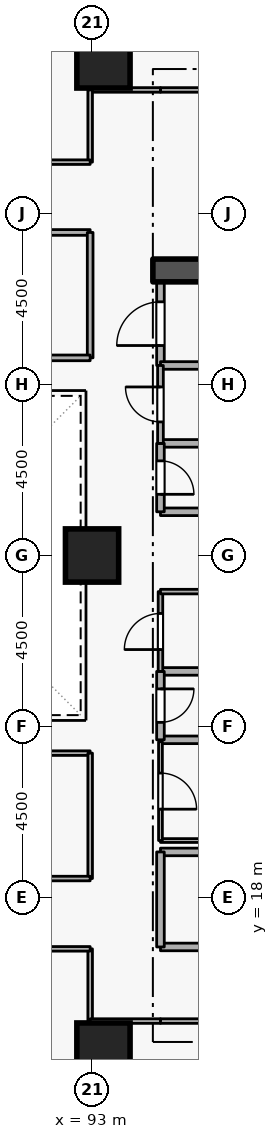
"""IFC4 building model, lengths in metres.
Left out: names, types, materials, properties, quantities, classifications, styles, units other than length and angle.
Written with IfcOpenShell. Run it as: python <this file> out.ifc"""

import sys

from ifc_helpers import new_model, si_unit, direction, frame, frame_2d, origin, origin_2d, place, context, subcontext, project, spatial, rectangle, extrude, element, fill, save


model = new_model("IFC4")
c1 = context("Model", 3, precision=1e-05, world=origin(), true_north=direction((0.0, 1.0)))
c2 = subcontext(c1, "Body", "Model", "MODEL_VIEW")
j1 = project(units=[si_unit("LENGTHUNIT", "METRE"), si_unit("PLANEANGLEUNIT", "RADIAN")], contexts=[c1])
p1 = place(None, origin())
s1 = spatial("IfcSite", under=j1, at=p1, CompositionType="ELEMENT")
p2 = place(p1, origin())
s2 = spatial("IfcBuilding", under=s1, at=p2, CompositionType="ELEMENT")
p3 = place(p2, frame((0.0, 0.0, 42.3)))
s3 = spatial("IfcBuildingStorey", under=s2, at=p3, CompositionType="ELEMENT", Elevation=42.3)
p4 = place(p3, frame((94.6, 34.5, 0.0), z_axis=(0.0, 0.0, 1.0), x_axis=(1.0, 0.0, 0.0)))
e1 = element("IfcWall", 1, at=p4, inside=s3, PredefinedType="SHEAR", context=c2, shape_type="SweptSolid", body=[
    extrude(rectangle(XDim=5.7, YDim=0.6, at=frame_2d((2.85, 0.0))), origin(), (0.0, 0.0, 1.0), 3.6),
])
for number, where, z_axis, x_axis in (
    (2, (93.3, 14.0, 0.0), (0.0, 0.0, 1.0), (1.0, 0.0, 0.0)),
    (3, (93.3, 40.0, 0.0), (0.0, 0.0, 1.0), (1.0, 0.0, 0.0)),
    (4, (93.0, 27.0, 0.0), (0.0, 0.0, 1.0), (1.0, 0.0, 0.0)),
):
    element("IfcColumn", number, at=place(p3, frame(where, z_axis=z_axis, x_axis=x_axis)), inside=s3, PredefinedType="COLUMN", context=c2, shape_type="SweptSolid", body=[
        extrude(rectangle(XDim=1.4, YDim=1.4, at=origin_2d()), origin(), (0.0, 0.0, 1.0), 3.6),
    ])
p5 = place(p3, frame((94.8, 16.7, 0.0), z_axis=(0.0, 0.0, 1.0), x_axis=(1.0, 0.0, 0.0)))
e5 = element("IfcWall", 5, at=p5, inside=s3, PredefinedType="STANDARD", context=c2, shape_type="SweptSolid", body=[
    extrude(rectangle(XDim=5.7, YDim=0.2, at=frame_2d((2.85, 0.0))), origin(), (0.0, 0.0, 1.0), 3.34),
])
p6 = place(p5, frame((2.275, 0.0, 0.0)))
e6 = element("IfcOpeningElement", 6, at=p6, cuts=e5, PredefinedType="OPENING", context=c2, shape_type="SweptSolid", body=[
    extrude(rectangle(XDim=1.15, YDim=2.1, at=frame_2d((0.575, 1.05))), frame((0.0, 0.11, 0.0), z_axis=(0.0, -1.0, 0.0), x_axis=(1.0, 0.0, 0.0)), (0.0, 0.0, 1.0), 0.22),
])
p7 = place(p3, frame((97.1, 19.2, 0.0), z_axis=(0.0, 0.0, 1.0), x_axis=(-1.0, 0.0, 0.0)))
e7 = element("IfcWall", 7, at=p7, inside=s3, PredefinedType="STANDARD", context=c2, shape_type="SweptSolid", body=[
    extrude(rectangle(XDim=2.3, YDim=0.2, at=frame_2d((1.15, 0.0))), origin(), (0.0, 0.0, 1.0), 2.545),
])
p8 = place(p3, frame((94.8, 19.2, 0.0), z_axis=(0.0, 0.0, 1.0), x_axis=(0.0, -1.0, 0.0)))
e8 = element("IfcWall", 8, at=p8, inside=s3, PredefinedType="STANDARD", context=c2, shape_type="SweptSolid", body=[
    extrude(rectangle(XDim=2.5, YDim=0.2, at=frame_2d((1.25, 0.0))), origin(), (0.0, 0.0, 1.0), 3.34),
])
for number, where, z_axis, x_axis in (
    (9, (94.8, 28.15, 0.0), (0.0, 0.0, 1.0), (1.0, 0.0, 0.0)),
    (10, (96.85, 29.95, 0.0), (0.0, 0.0, 1.0), (-1.0, 0.0, 0.0)),
):
    element("IfcWall", number, at=place(p3, frame(where, z_axis=z_axis, x_axis=x_axis)), inside=s3, PredefinedType="STANDARD", context=c2, shape_type="SweptSolid", body=[
        extrude(rectangle(XDim=2.05, YDim=0.2, at=frame_2d((1.025, 0.0))), origin(), (0.0, 0.0, 1.0), 3.34),
    ])
p9 = place(p3, frame((94.8, 29.95, 0.0), z_axis=(0.0, 0.0, 1.0), x_axis=(0.0, -1.0, 0.0)))
e11 = element("IfcWall", 11, at=p9, inside=s3, PredefinedType="STANDARD", context=c2, shape_type="SweptSolid", body=[
    extrude(rectangle(XDim=1.8, YDim=0.2, at=frame_2d((0.9, 0.0))), origin(), (0.0, 0.0, 1.0), 3.34),
])
p10 = place(p9, frame((0.46, 0.0, 0.0)))
e12 = element("IfcOpeningElement", 12, at=p10, cuts=e11, PredefinedType="OPENING", context=c2, shape_type="SweptSolid", body=[
    extrude(rectangle(XDim=0.88, YDim=2.04, at=frame_2d((0.44, 1.02))), frame((0.0, 0.11, 0.0), z_axis=(0.0, -1.0, 0.0), x_axis=(1.0, 0.0, 0.0)), (0.0, 0.0, 1.0), 0.22),
])
for number, where, z_axis, x_axis in (
    (13, (94.8, 22.15, 0.0), (0.0, 0.0, 1.0), (1.0, 0.0, 0.0)),
    (14, (96.85, 23.95, 0.0), (0.0, 0.0, 1.0), (-1.0, 0.0, 0.0)),
):
    element("IfcWall", number, at=place(p3, frame(where, z_axis=z_axis, x_axis=x_axis)), inside=s3, PredefinedType="STANDARD", context=c2, shape_type="SweptSolid", body=[
        extrude(rectangle(XDim=2.05, YDim=0.2, at=frame_2d((1.025, 0.0))), origin(), (0.0, 0.0, 1.0), 3.34),
    ])
p11 = place(p3, frame((94.8, 23.95, 0.0), z_axis=(0.0, 0.0, 1.0), x_axis=(0.0, -1.0, 0.0)))
e15 = element("IfcWall", 15, at=p11, inside=s3, PredefinedType="STANDARD", context=c2, shape_type="SweptSolid", body=[
    extrude(rectangle(XDim=1.8, YDim=0.2, at=frame_2d((0.9, 0.0))), origin(), (0.0, 0.0, 1.0), 3.34),
])
p12 = place(p11, frame((0.46, 0.0, 0.0)))
e16 = element("IfcOpeningElement", 16, at=p12, cuts=e15, PredefinedType="OPENING", context=c2, shape_type="SweptSolid", body=[
    extrude(rectangle(XDim=0.88, YDim=2.04, at=frame_2d((0.44, 1.02))), frame((0.0, 0.11, 0.0), z_axis=(0.0, -1.0, 0.0), x_axis=(1.0, 0.0, 0.0)), (0.0, 0.0, 1.0), 0.22),
])
p13 = place(p3, frame((94.8, 32.0, 0.0), z_axis=(0.0, 0.0, 1.0), x_axis=(0.0, 1.0, 0.0)))
e17 = element("IfcWall", 17, at=p13, inside=s3, PredefinedType="STANDARD", context=c2, shape_type="SweptSolid", body=[
    extrude(rectangle(XDim=2.2, YDim=0.2, at=frame_2d((1.1, 0.0))), origin(), (0.0, 0.0, 1.0), 3.34),
])
p14 = place(p13, frame((0.525, 0.0, 0.0)))
e18 = element("IfcOpeningElement", 18, at=p14, cuts=e17, PredefinedType="OPENING", context=c2, shape_type="SweptSolid", body=[
    extrude(rectangle(XDim=1.15, YDim=2.1, at=frame_2d((0.575, 1.05))), frame((0.0, 0.11, 0.0), z_axis=(0.0, -1.0, 0.0), x_axis=(1.0, 0.0, 0.0)), (0.0, 0.0, 1.0), 0.22),
])
p15 = place(p3, frame((96.85, 32.0, 0.0), z_axis=(0.0, 0.0, 1.0), x_axis=(-1.0, 0.0, 0.0)))
e19 = element("IfcWall", 19, at=p15, inside=s3, PredefinedType="STANDARD", context=c2, shape_type="SweptSolid", body=[
    extrude(rectangle(XDim=2.05, YDim=0.2, at=frame_2d((1.025, 0.0))), origin(), (0.0, 0.0, 1.0), 3.34),
])
p16 = place(p3, frame((94.8, 19.5, 0.0), z_axis=(0.0, 0.0, 1.0), x_axis=(1.0, 0.0, 0.0)))
e20 = element("IfcWall", 20, at=p16, inside=s3, PredefinedType="PARTITIONING", context=c2, shape_type="SweptSolid", body=[
    extrude(rectangle(XDim=2.05, YDim=0.1, at=frame_2d((1.025, 0.0))), origin(), (0.0, 0.0, 1.0), 2.545),
])
p17 = place(p3, frame((94.8, 22.1, 0.0), z_axis=(0.0, 0.0, 1.0), x_axis=(0.0, -1.0, 0.0)))
e21 = element("IfcWall", 21, at=p17, inside=s3, PredefinedType="PARTITIONING", context=c2, shape_type="SweptSolid", body=[
    extrude(rectangle(XDim=2.6, YDim=0.1, at=frame_2d((1.3, 0.0))), origin(), (0.0, 0.0, 1.0), 3.34),
])
p18 = place(p17, frame((0.825, 0.0, 0.0)))
e22 = element("IfcOpeningElement", 22, at=p18, cuts=e21, PredefinedType="OPENING", context=c2, shape_type="SweptSolid", body=[
    extrude(rectangle(XDim=0.95, YDim=2.1, at=frame_2d((0.475, 1.05))), frame((0.0, 0.06, 0.0), z_axis=(0.0, -1.0, 0.0), x_axis=(1.0, 0.0, 0.0)), (0.0, 0.0, 1.0), 0.12),
])
p19 = place(p3, frame((94.8, 23.95, 0.0), z_axis=(0.0, 0.0, 1.0), x_axis=(0.0, 1.0, 0.0)))
e23 = element("IfcWall", 23, at=p19, inside=s3, PredefinedType="PARTITIONING", context=c2, shape_type="SweptSolid", body=[
    extrude(rectangle(XDim=2.1, YDim=0.12, at=frame_2d((1.05, 0.0))), origin(), (0.0, 0.0, 1.0), 3.34),
])
p20 = place(p19, frame((0.575, 0.0, 0.0)))
e24 = element("IfcOpeningElement", 24, at=p20, cuts=e23, PredefinedType="OPENING", context=c2, shape_type="SweptSolid", body=[
    extrude(rectangle(XDim=0.95, YDim=2.1, at=frame_2d((0.475, 1.05))), frame((0.0, 0.07, 0.0), z_axis=(0.0, -1.0, 0.0), x_axis=(1.0, 0.0, 0.0)), (0.0, 0.0, 1.0), 0.14),
])
p21 = place(p3, frame((94.8, 26.05, 0.0), z_axis=(0.0, 0.0, 1.0), x_axis=(1.0, 0.0, 0.0)))
e25 = element("IfcWall", 25, at=p21, inside=s3, PredefinedType="PARTITIONING", context=c2, shape_type="SweptSolid", body=[
    extrude(rectangle(XDim=2.05, YDim=0.12, at=frame_2d((1.025, 0.0))), origin(), (0.0, 0.0, 1.0), 3.34),
])
p22 = place(p3, frame((94.8, 29.95, 0.0), z_axis=(0.0, 0.0, 1.0), x_axis=(0.0, 1.0, 0.0)))
e26 = element("IfcWall", 26, at=p22, inside=s3, PredefinedType="PARTITIONING", context=c2, shape_type="SweptSolid", body=[
    extrude(rectangle(XDim=2.05, YDim=0.15, at=frame_2d((1.025, 0.0))), origin(), (0.0, 0.0, 1.0), 3.34),
])
p23 = place(p22, frame((0.565, 0.0, 0.0)))
e27 = element("IfcOpeningElement", 27, at=p23, cuts=e26, PredefinedType="OPENING", context=c2, shape_type="SweptSolid", body=[
    extrude(rectangle(XDim=0.92, YDim=2.08, at=frame_2d((0.46, 1.04))), frame((0.0, 0.085, 0.0), z_axis=(0.0, -1.0, 0.0), x_axis=(1.0, 0.0, 0.0)), (0.0, 0.0, 1.0), 0.17),
])
p24 = place(p3, frame((92.95, 16.65, 0.0), z_axis=(0.0, 0.0, 1.0), x_axis=(0.0, -1.0, 0.0)))
e28 = element("IfcWall", 28, at=p24, inside=s3, PredefinedType="PARTITIONING", context=c2, shape_type="SweptSolid", body=[
    extrude(rectangle(XDim=1.9, YDim=0.12, at=frame_2d((0.95, 0.0))), origin(), (0.0, 0.0, 1.0), 3.34),
])
p25 = place(p3, frame((92.95, 14.75, 0.0), z_axis=(0.0, 0.0, 1.0), x_axis=(1.0, 0.0, 0.0)))
e29 = element("IfcWall", 29, at=p25, inside=s3, PredefinedType="PARTITIONING", context=c2, shape_type="SweptSolid", body=[
    extrude(rectangle(XDim=1.85, YDim=0.12, at=frame_2d((0.925, 0.0))), origin(), (0.0, 0.0, 1.0), 3.34),
])
p26 = place(p3, frame((94.8, 14.75, 0.0), z_axis=(0.0, 0.0, 1.0), x_axis=(1.0, 0.0, 0.0)))
e30 = element("IfcWall", 30, at=p26, inside=s3, PredefinedType="PARTITIONING", context=c2, shape_type="SweptSolid", body=[
    extrude(rectangle(XDim=9.35, YDim=0.12, at=frame_2d((4.675, 0.0))), origin(), (0.0, 0.0, 1.0), 3.34),
])
p27 = place(p26, frame((4.15, 0.0, 0.0)))
e31 = element("IfcOpeningElement", 31, at=p27, cuts=e30, PredefinedType="OPENING", context=c2, shape_type="SweptSolid", body=[
    extrude(rectangle(XDim=1.05, YDim=2.1, at=frame_2d((0.525, 1.05))), frame((0.0, 0.07, 0.0), z_axis=(0.0, -1.0, 0.0), x_axis=(1.0, 0.0, 0.0)), (0.0, 0.0, 1.0), 0.14),
])
p28 = place(p3, frame((88.5, 16.65, 0.0), z_axis=(0.0, 0.0, 1.0), x_axis=(1.0, 0.0, 0.0)))
e32 = element("IfcWall", 32, at=p28, inside=s3, PredefinedType="PARTITIONING", context=c2, shape_type="SweptSolid", body=[
    extrude(rectangle(XDim=4.45, YDim=0.12, at=frame_2d((2.225, 0.0))), origin(), (0.0, 0.0, 1.0), 3.34),
])
p29 = place(p3, frame((97.95, 39.25, 0.0), z_axis=(0.0, 0.0, 1.0), x_axis=(-1.0, 0.0, 0.0)))
e33 = element("IfcWall", 33, at=p29, inside=s3, PredefinedType="PARTITIONING", context=c2, shape_type="SweptSolid", body=[
    extrude(rectangle(XDim=3.15, YDim=0.12, at=frame_2d((1.575, 0.0))), origin(), (0.0, 0.0, 1.0), 3.34),
])
p30 = place(p3, frame((94.8, 39.25, 0.0), z_axis=(0.0, 0.0, 1.0), x_axis=(-1.0, 0.0, 0.0)))
e34 = element("IfcWall", 34, at=p30, inside=s3, PredefinedType="PARTITIONING", context=c2, shape_type="SweptSolid", body=[
    extrude(rectangle(XDim=1.85, YDim=0.12, at=frame_2d((0.925, 0.0))), origin(), (0.0, 0.0, 1.0), 3.34),
])
p31 = place(p3, frame((92.95, 39.25, 0.0), z_axis=(0.0, 0.0, 1.0), x_axis=(0.0, -1.0, 0.0)))
e35 = element("IfcWall", 35, at=p31, inside=s3, PredefinedType="PARTITIONING", context=c2, shape_type="SweptSolid", body=[
    extrude(rectangle(XDim=1.9, YDim=0.12, at=frame_2d((0.95, 0.0))), origin(), (0.0, 0.0, 1.0), 3.34),
])
p32 = place(p3, frame((92.95, 37.35, 0.0), z_axis=(0.0, 0.0, 1.0), x_axis=(-1.0, 0.0, 0.0)))
e36 = element("IfcWall", 36, at=p32, inside=s3, PredefinedType="PARTITIONING", context=c2, shape_type="SweptSolid", body=[
    extrude(rectangle(XDim=4.45, YDim=0.12, at=frame_2d((2.225, 0.0))), origin(), (0.0, 0.0, 1.0), 3.34),
])
p33 = place(p32, frame((1.7, 0.0, 0.0)))
e37 = element("IfcOpeningElement", 37, at=p33, cuts=e36, PredefinedType="OPENING", context=c2, shape_type="SweptSolid", body=[
    extrude(rectangle(XDim=1.05, YDim=2.1, at=frame_2d((0.525, 1.05))), frame((0.0, 0.07, 0.0), z_axis=(0.0, -1.0, 0.0), x_axis=(1.0, 0.0, 0.0)), (0.0, 0.0, 1.0), 0.14),
])
p34 = place(p3, frame((84.05, 35.5, 0.0), z_axis=(0.0, 0.0, 1.0), x_axis=(1.0, 0.0, 0.0)))
e38 = element("IfcWall", 38, at=p34, inside=s3, PredefinedType="PARTITIONING", context=c2, shape_type="SweptSolid", body=[
    extrude(rectangle(XDim=8.9, YDim=0.15, at=frame_2d((4.45, 0.0))), origin(), (0.0, 0.0, 1.0), 3.34),
])
p35 = place(p34, frame((3.8, 0.0, 0.0)))
e39 = element("IfcOpeningElement", 39, at=p35, cuts=e38, PredefinedType="OPENING", context=c2, shape_type="SweptSolid", body=[
    extrude(rectangle(XDim=1.3, YDim=2.12, at=frame_2d((0.65, 1.06))), frame((0.0, 0.085, 0.0), z_axis=(0.0, -1.0, 0.0), x_axis=(1.0, 0.0, 0.0)), (0.0, 0.0, 1.0), 0.17),
])
p36 = place(p3, frame((92.95, 35.5, 0.0), z_axis=(0.0, 0.0, 1.0), x_axis=(0.0, -1.0, 0.0)))
e40 = element("IfcWall", 40, at=p36, inside=s3, PredefinedType="PARTITIONING", context=c2, shape_type="SweptSolid", body=[
    extrude(rectangle(XDim=3.3, YDim=0.15, at=frame_2d((1.65, 0.0))), origin(), (0.0, 0.0, 1.0), 3.34),
])
p37 = place(p3, frame((92.95, 32.2, 0.0), z_axis=(0.0, 0.0, 1.0), x_axis=(-1.0, 0.0, 0.0)))
e41 = element("IfcWall", 41, at=p37, inside=s3, PredefinedType="PARTITIONING", context=c2, shape_type="SweptSolid", body=[
    extrude(rectangle(XDim=8.9, YDim=0.15, at=frame_2d((4.45, 0.0))), origin(), (0.0, 0.0, 1.0), 3.34),
])
p38 = place(p3, frame((84.05, 21.8, 0.0), z_axis=(0.0, 0.0, 1.0), x_axis=(1.0, 0.0, 0.0)))
e42 = element("IfcWall", 42, at=p38, inside=s3, PredefinedType="PARTITIONING", context=c2, shape_type="SweptSolid", body=[
    extrude(rectangle(XDim=8.9, YDim=0.12, at=frame_2d((4.45, 0.0))), origin(), (0.0, 0.0, 1.0), 3.34),
])
p39 = place(p3, frame((92.95, 21.8, 0.0), z_axis=(0.0, 0.0, 1.0), x_axis=(0.0, -1.0, 0.0)))
e43 = element("IfcWall", 43, at=p39, inside=s3, PredefinedType="PARTITIONING", context=c2, shape_type="SweptSolid", body=[
    extrude(rectangle(XDim=3.3, YDim=0.12, at=frame_2d((1.65, 0.0))), origin(), (0.0, 0.0, 1.0), 3.34),
])
p40 = place(p3, frame((92.95, 18.5, 0.0), z_axis=(0.0, 0.0, 1.0), x_axis=(-1.0, 0.0, 0.0)))
e44 = element("IfcWall", 44, at=p40, inside=s3, PredefinedType="PARTITIONING", context=c2, shape_type="SweptSolid", body=[
    extrude(rectangle(XDim=8.9, YDim=0.12, at=frame_2d((4.45, 0.0))), origin(), (0.0, 0.0, 1.0), 3.34),
])
p41 = place(p40, frame((3.975, 0.0, 0.0)))
e45 = element("IfcOpeningElement", 45, at=p41, cuts=e44, PredefinedType="OPENING", context=c2, shape_type="SweptSolid", body=[
    extrude(rectangle(XDim=0.95, YDim=2.1, at=frame_2d((0.475, 1.05))), frame((0.0, 0.07, 0.0), z_axis=(0.0, -1.0, 0.0), x_axis=(1.0, 0.0, 0.0)), (0.0, 0.0, 1.0), 0.14),
])
p42 = place(p10, origin())
e46 = element("IfcDoor", 46, at=p42, inside=s3, OperationType="SINGLE_SWING_RIGHT", PredefinedType="DOOR", context=c2, shape_type="SweptSolid", body=[
    extrude(rectangle(XDim=0.88, YDim=2.04, at=frame_2d((0.44, 1.02))), frame((0.0, 0.025, 0.0), z_axis=(0.0, -1.0, 0.0), x_axis=(1.0, 0.0, 0.0)), (0.0, 0.0, 1.0), 0.05),
])
fill(e12, e46)
p43 = place(p12, origin())
e47 = element("IfcDoor", 47, at=p43, inside=s3, OperationType="SINGLE_SWING_LEFT", PredefinedType="DOOR", context=c2, shape_type="SweptSolid", body=[
    extrude(rectangle(XDim=0.88, YDim=2.04, at=frame_2d((0.44, 1.02))), frame((0.0, 0.025, 0.0), z_axis=(0.0, -1.0, 0.0), x_axis=(1.0, 0.0, 0.0)), (0.0, 0.0, 1.0), 0.05),
])
fill(e16, e47)
p44 = place(p18, origin())
e48 = element("IfcDoor", 48, at=p44, inside=s3, OperationType="SINGLE_SWING_RIGHT", PredefinedType="DOOR", context=c2, shape_type="SweptSolid", body=[
    extrude(rectangle(XDim=0.95, YDim=2.1, at=frame_2d((0.475, 1.05))), frame((0.0, 0.025, 0.0), z_axis=(0.0, -1.0, 0.0), x_axis=(1.0, 0.0, 0.0)), (0.0, 0.0, 1.0), 0.05),
])
fill(e22, e48)
p45 = place(p20, origin())
e49 = element("IfcDoor", 49, at=p45, inside=s3, OperationType="SINGLE_SWING_LEFT", PredefinedType="DOOR", context=c2, shape_type="SweptSolid", body=[
    extrude(rectangle(XDim=0.95, YDim=2.1, at=frame_2d((0.475, 1.05))), frame((0.0, 0.025, 0.0), z_axis=(0.0, -1.0, 0.0), x_axis=(1.0, 0.0, 0.0)), (0.0, 0.0, 1.0), 0.05),
])
fill(e24, e49)
p46 = place(p23, origin())
e50 = element("IfcDoor", 50, at=p46, inside=s3, OperationType="SINGLE_SWING_RIGHT", PredefinedType="DOOR", context=c2, shape_type="SweptSolid", body=[
    extrude(rectangle(XDim=0.92, YDim=2.08, at=frame_2d((0.46, 1.04))), frame((0.0, 0.025, 0.0), z_axis=(0.0, -1.0, 0.0), x_axis=(1.0, 0.0, 0.0)), (0.0, 0.0, 1.0), 0.05),
])
fill(e27, e50)
p47 = place(p14, origin())
e51 = element("IfcDoor", 51, at=p47, inside=s3, OperationType="SINGLE_SWING_LEFT", PredefinedType="DOOR", context=c2, shape_type="SweptSolid", body=[
    extrude(rectangle(XDim=1.15, YDim=2.1, at=frame_2d((0.575, 1.05))), frame((0.0, 0.025, 0.0), z_axis=(0.0, -1.0, 0.0), x_axis=(1.0, 0.0, 0.0)), (0.0, 0.0, 1.0), 0.05),
])
fill(e18, e51)
save(model, sys.argv[1])
